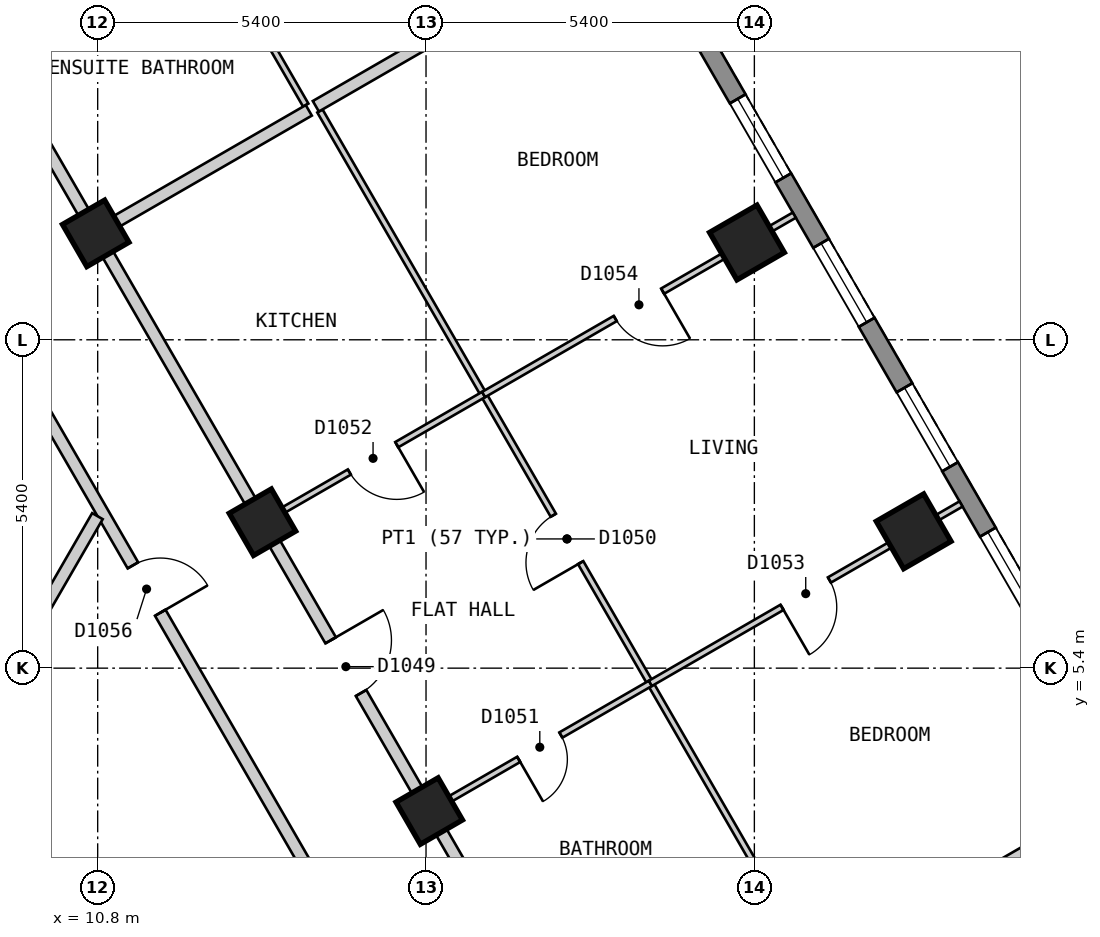
"""IFC4 building model, lengths in metres.
Left out: names, types, materials, properties, quantities, classifications, styles, units other than length and angle.
Written with IfcOpenShell. Run it as: python <this file> out.ifc"""

import sys

from ifc_helpers import new_model, si_unit, direction, frame, frame_2d, origin, origin_2d, place, context, subcontext, project, spatial, polyline, rectangle, outline, extrude, element, fill, save


model = new_model("IFC4")
c1 = context("Model", 3, precision=1e-05, world=origin(), true_north=direction((0.0, 1.0)))
c2 = subcontext(c1, "Body", "Model", "MODEL_VIEW")
j1 = project(units=[si_unit("LENGTHUNIT", "METRE"), si_unit("PLANEANGLEUNIT", "RADIAN")], contexts=[c1])
p1 = place(None, origin())
s1 = spatial("IfcSite", under=j1, at=p1, CompositionType="ELEMENT")
p2 = place(p1, origin())
s2 = spatial("IfcBuilding", under=s1, at=p2, CompositionType="ELEMENT")
p3 = place(p2, frame((0.0, 0.0, 126.6)))
s3 = spatial("IfcBuildingStorey", under=s2, at=p3, CompositionType="ELEMENT", Elevation=126.6)
for number, where, z_axis, x_axis in (
    (1, (24.22, 7.65, 0.0), (0.0, 0.0, 1.0), (-0.5, 0.866, 0.0)),
    (2, (21.478, 12.4, 0.0), (0.0, 0.0, 1.0), (-0.5, 0.866, 0.0)),
):
    element("IfcColumn", number, at=place(p3, frame(where, z_axis=z_axis, x_axis=x_axis)), inside=s3, PredefinedType="COLUMN", context=c2, shape_type="SweptSolid", body=[
        extrude(rectangle(XDim=0.9, YDim=0.9, at=origin_2d()), origin(), (0.0, 0.0, 1.0), 3.0),
    ])
for number, where, z_axis, x_axis in (
    (3, (16.253, 3.05, 0.0), (0.0, 0.0, 1.0), (-0.5, 0.866, 0.0)),
    (4, (13.51, 7.8, 0.0), (0.0, 0.0, 1.0), (-0.5, 0.866, 0.0)),
    (5, (10.768, 12.55, 0.0), (0.0, 0.0, 1.0), (-0.5, 0.866, 0.0)),
):
    element("IfcColumn", number, at=place(p3, frame(where, z_axis=z_axis, x_axis=x_axis)), inside=s3, PredefinedType="COLUMN", context=c2, shape_type="SweptSolid", body=[
        extrude(rectangle(XDim=0.8, YDim=0.8, at=origin_2d()), origin(), (0.0, 0.0, 1.0), 3.0),
    ])
p4 = place(p3, frame((28.218, 2.825, 0.0), z_axis=(0.0, 0.0, 1.0), x_axis=(-0.500020536353, 0.866013546791, 0.0)))
e6 = element("IfcWall", 6, at=p4, inside=s3, PredefinedType="SOLIDWALL", context=c2, shape_type="SweptSolid", body=[
    extrude(outline(polyline([(0.0, -0.15), (23.325, -0.15), (23.245, 0.15), (0.08, 0.15), (0.0, -0.15)])), origin(), (0.0, 0.0, 1.0), 2.7),
])
p5 = place(p4, frame((1.314, 0.0, 0.15)))
e7 = element("IfcOpeningElement", 7, at=p5, cuts=e6, PredefinedType="OPENING", context=c2, shape_type="SweptSolid", body=[
    extrude(rectangle(XDim=1.5, YDim=2.1, at=frame_2d((0.75, 1.05))), frame((0.0, 0.16, 0.0), z_axis=(0.0, -1.0, 0.0), x_axis=(1.0, 0.0, 0.0)), (0.0, 0.0, 1.0), 0.32),
])
p6 = place(p4, frame((4.056, 0.0, 0.15)))
e8 = element("IfcOpeningElement", 8, at=p6, cuts=e6, PredefinedType="OPENING", context=c2, shape_type="SweptSolid", body=[
    extrude(rectangle(XDim=1.5, YDim=2.1, at=frame_2d((0.75, 1.05))), frame((0.0, 0.16, 0.0), z_axis=(0.0, -1.0, 0.0), x_axis=(1.0, 0.0, 0.0)), (0.0, 0.0, 1.0), 0.32),
])
p7 = place(p4, frame((6.798, 0.0, 0.15)))
e9 = element("IfcOpeningElement", 9, at=p7, cuts=e6, PredefinedType="OPENING", context=c2, shape_type="SweptSolid", body=[
    extrude(rectangle(XDim=1.5, YDim=2.1, at=frame_2d((0.75, 1.05))), frame((0.0, 0.16, 0.0), z_axis=(0.0, -1.0, 0.0), x_axis=(1.0, 0.0, 0.0)), (0.0, 0.0, 1.0), 0.32),
])
p8 = place(p4, frame((9.541, 0.0, 0.15)))
e10 = element("IfcOpeningElement", 10, at=p8, cuts=e6, PredefinedType="OPENING", context=c2, shape_type="SweptSolid", body=[
    extrude(rectangle(XDim=1.5, YDim=2.1, at=frame_2d((0.75, 1.05))), frame((0.0, 0.16, 0.0), z_axis=(0.0, -1.0, 0.0), x_axis=(1.0, 0.0, 0.0)), (0.0, 0.0, 1.0), 0.32),
])
p9 = place(p4, frame((12.284, 0.0, 0.15)))
e11 = element("IfcOpeningElement", 11, at=p9, cuts=e6, PredefinedType="OPENING", context=c2, shape_type="SweptSolid", body=[
    extrude(rectangle(XDim=1.5, YDim=2.1, at=frame_2d((0.75, 1.05))), frame((0.0, 0.16, 0.0), z_axis=(0.0, -1.0, 0.0), x_axis=(1.0, 0.0, 0.0)), (0.0, 0.0, 1.0), 0.32),
])
p10 = place(p4, frame((15.027, 0.0, 0.15)))
e12 = element("IfcOpeningElement", 12, at=p10, cuts=e6, PredefinedType="OPENING", context=c2, shape_type="SweptSolid", body=[
    extrude(rectangle(XDim=1.5, YDim=2.1, at=frame_2d((0.75, 1.05))), frame((0.0, 0.16, 0.0), z_axis=(0.0, -1.0, 0.0), x_axis=(1.0, 0.0, 0.0)), (0.0, 0.0, 1.0), 0.32),
])
p11 = place(p4, frame((17.769, 0.0, 0.15)))
e13 = element("IfcOpeningElement", 13, at=p11, cuts=e6, PredefinedType="OPENING", context=c2, shape_type="SweptSolid", body=[
    extrude(rectangle(XDim=1.5, YDim=2.1, at=frame_2d((0.75, 1.05))), frame((0.0, 0.16, 0.0), z_axis=(0.0, -1.0, 0.0), x_axis=(1.0, 0.0, 0.0)), (0.0, 0.0, 1.0), 0.32),
])
p12 = place(p4, frame((20.511, 0.0, 0.15)))
e14 = element("IfcOpeningElement", 14, at=p12, cuts=e6, PredefinedType="OPENING", context=c2, shape_type="SweptSolid", body=[
    extrude(rectangle(XDim=1.5, YDim=2.1, at=frame_2d((0.75, 1.05))), frame((0.0, 0.16, 0.0), z_axis=(0.0, -1.0, 0.0), x_axis=(1.0, 0.0, 0.0)), (0.0, 0.0, 1.0), 0.32),
])
p13 = place(p3, frame((7.967, 13.0, 0.0), z_axis=(0.0, 0.0, 1.0), x_axis=(0.50003774998, -0.866003607726, 0.0)))
e15 = element("IfcWall", 15, at=p13, inside=s3, PredefinedType="PARTITIONING", context=c2, shape_type="SweptSolid", body=[
    extrude(rectangle(XDim=14.433, YDim=0.2, at=frame_2d((7.217, 0.0))), origin(), (0.0, 0.0, 1.0), 2.7),
])
p14 = place(p13, frame((6.824, 0.0, 0.0)))
e16 = element("IfcOpeningElement", 16, at=p14, cuts=e15, PredefinedType="OPENING", context=c2, shape_type="SweptSolid", body=[
    extrude(rectangle(XDim=0.9, YDim=2.1, at=frame_2d((0.45, 1.05))), frame((0.0, 0.11, 0.0), z_axis=(0.0, -1.0, 0.0), x_axis=(1.0, 0.0, 0.0)), (0.0, 0.0, 1.0), 0.22),
])
p15 = place(p3, frame((9.296, 15.1, 0.0), z_axis=(0.0, 0.0, 1.0), x_axis=(0.499974024244, -0.866040400375, 0.0)))
e17 = element("IfcWall", 17, at=p15, inside=s3, PredefinedType="PARTITIONING", context=c2, shape_type="SweptSolid", body=[
    extrude(rectangle(XDim=16.857, YDim=0.2, at=frame_2d((8.429, 0.0))), origin(), (0.0, 0.0, 1.0), 2.7),
])
p16 = place(p15, frame((10.672, 0.0, 0.0)))
e18 = element("IfcOpeningElement", 18, at=p16, cuts=e17, PredefinedType="OPENING", context=c2, shape_type="SweptSolid", body=[
    extrude(rectangle(XDim=1.0, YDim=2.1, at=frame_2d((0.5, 1.05))), frame((0.0, 0.11, 0.0), z_axis=(0.0, -1.0, 0.0), x_axis=(1.0, 0.0, 0.0)), (0.0, 0.0, 1.0), 0.22),
])
p17 = place(p3, frame((7.028, 1.373, 0.0), z_axis=(0.0, 0.0, 1.0), x_axis=(0.499954271211, 0.866051803703, 0.0)))
e19 = element("IfcWall", 19, at=p17, inside=s3, PredefinedType="PARTITIONING", context=c2, shape_type="SweptSolid", body=[
    extrude(rectangle(XDim=7.536, YDim=0.2, at=frame_2d((3.768, 0.0))), origin(), (0.0, 0.0, 1.0), 2.7),
])
p18 = place(p3, frame((11.603, 19.196, 0.0), z_axis=(0.0, 0.0, 1.0), x_axis=(0.499913406181, -0.866075392977, 0.0)))
e20 = element("IfcWall", 20, at=p18, inside=s3, PredefinedType="PARTITIONING", context=c2, shape_type="SweptSolid", body=[
    extrude(rectangle(XDim=5.239, YDim=0.1, at=frame_2d((2.619, 0.0))), origin(), (0.0, 0.0, 1.0), 2.7),
])
p19 = place(p18, frame((2.24, 0.0, 0.0)))
e21 = element("IfcOpeningElement", 21, at=p19, cuts=e20, PredefinedType="OPENING", context=c2, shape_type="SweptSolid", body=[
    extrude(rectangle(XDim=0.8, YDim=2.1, at=frame_2d((0.4, 1.05))), frame((0.0, 0.06, 0.0), z_axis=(0.0, -1.0, 0.0), x_axis=(1.0, 0.0, 0.0)), (0.0, 0.0, 1.0), 0.12),
])
p20 = place(p3, frame((14.455, 14.563, 0.0), z_axis=(0.0, 0.0, 1.0), x_axis=(0.500009803579, -0.866019743612, 0.0)))
e22 = element("IfcWall", 22, at=p20, inside=s3, PredefinedType="PARTITIONING", context=c2, shape_type="SweptSolid", body=[
    extrude(rectangle(XDim=16.254, YDim=0.1, at=frame_2d((8.127, 0.0))), origin(), (0.0, 0.0, 1.0), 2.7),
])
p21 = place(p20, frame((7.677, 0.0, 0.0)))
e23 = element("IfcOpeningElement", 23, at=p21, cuts=e22, PredefinedType="OPENING", context=c2, shape_type="SweptSolid", body=[
    extrude(rectangle(XDim=0.9, YDim=2.1, at=frame_2d((0.45, 1.05))), frame((0.0, 0.06, 0.0), z_axis=(0.0, -1.0, 0.0), x_axis=(1.0, 0.0, 0.0)), (0.0, 0.0, 1.0), 0.12),
])
p22 = place(p3, frame((9.238, 15.2, 0.0), z_axis=(0.0, 0.0, 1.0), x_axis=(0.499983303743, 0.866035043158, 0.0)))
e24 = element("IfcWall", 24, at=p22, inside=s3, PredefinedType="PARTITIONING", context=c2, shape_type="SweptSolid", body=[
    extrude(rectangle(XDim=4.672, YDim=0.1, at=frame_2d((2.336, 0.0))), origin(), (0.0, 0.0, 1.0), 2.7),
])
p23 = place(p3, frame((8.346, 15.3, 0.0), z_axis=(0.0, 0.0, 1.0), x_axis=(0.415189790387, 0.909734817383, 0.0)))
e25 = element("IfcWall", 25, at=p23, inside=s3, PredefinedType="PARTITIONING", context=c2, shape_type="SweptSolid", body=[
    extrude(rectangle(XDim=4.282, YDim=0.1, at=frame_2d((2.141, 0.0))), origin(), (0.0, 0.0, 1.0), 2.7),
])
p24 = place(p23, frame((1.714, 0.0, 0.0)))
e26 = element("IfcOpeningElement", 26, at=p24, cuts=e25, PredefinedType="OPENING", context=c2, shape_type="SweptSolid", body=[
    extrude(rectangle(XDim=0.8, YDim=2.1, at=frame_2d((0.4, 1.05))), frame((0.0, 0.06, 0.0), z_axis=(0.0, -1.0, 0.0), x_axis=(1.0, 0.0, 0.0)), (0.0, 0.0, 1.0), 0.12),
])
p25 = place(p3, frame((16.339, 3.1, 0.0), z_axis=(0.0, 0.0, 1.0), x_axis=(0.866050731258, 0.499956128963, 0.0)))
e27 = element("IfcWall", 27, at=p25, inside=s3, PredefinedType="PARTITIONING", context=c2, shape_type="SweptSolid", body=[
    extrude(rectangle(XDim=4.1, YDim=0.1, at=frame_2d((2.05, 0.0))), origin(), (0.0, 0.0, 1.0), 2.7),
])
p26 = place(p25, frame((1.6, 0.0, 0.0)))
e28 = element("IfcOpeningElement", 28, at=p26, cuts=e27, PredefinedType="OPENING", context=c2, shape_type="SweptSolid", body=[
    extrude(rectangle(XDim=0.8, YDim=2.1, at=frame_2d((0.4, 1.05))), frame((0.0, 0.06, 0.0), z_axis=(0.0, -1.0, 0.0), x_axis=(1.0, 0.0, 0.0)), (0.0, 0.0, 1.0), 0.12),
])
p27 = place(p3, frame((13.597, 7.85, 0.0), z_axis=(0.0, 0.0, 1.0), x_axis=(0.866006068523, 0.500033488159, 0.0)))
e29 = element("IfcWall", 29, at=p27, inside=s3, PredefinedType="PARTITIONING", context=c2, shape_type="SweptSolid", body=[
    extrude(rectangle(XDim=4.099, YDim=0.1, at=frame_2d((2.05, 0.0))), origin(), (0.0, 0.0, 1.0), 2.7),
])
p28 = place(p27, frame((1.55, 0.0, 0.0)))
e30 = element("IfcOpeningElement", 30, at=p28, cuts=e29, PredefinedType="OPENING", context=c2, shape_type="SweptSolid", body=[
    extrude(rectangle(XDim=0.9, YDim=2.1, at=frame_2d((0.45, 1.05))), frame((0.0, 0.06, 0.0), z_axis=(0.0, -1.0, 0.0), x_axis=(1.0, 0.0, 0.0)), (0.0, 0.0, 1.0), 0.12),
])
p29 = place(p3, frame((22.634, 0.401, 0.0), z_axis=(0.0, 0.0, 1.0), x_axis=(0.86601325737, 0.500021037617, 0.0)))
e31 = element("IfcWall", 31, at=p29, inside=s3, PredefinedType="PARTITIONING", context=c2, shape_type="SweptSolid", body=[
    extrude(rectangle(XDim=5.898, YDim=0.2, at=frame_2d((2.949, 0.0))), origin(), (0.0, 0.0, 1.0), 2.7),
])
p30 = place(p3, frame((10.854, 12.6, 0.0), z_axis=(0.0, 0.0, 1.0), x_axis=(0.866076396086, 0.499911668341, 0.0)))
e32 = element("IfcWall", 32, at=p30, inside=s3, PredefinedType="PARTITIONING", context=c2, shape_type="SweptSolid", body=[
    extrude(rectangle(XDim=3.947, YDim=0.2, at=frame_2d((1.973, 0.0))), origin(), (0.0, 0.0, 1.0), 2.7),
])
p31 = place(p3, frame((14.388, 14.64, 0.0), z_axis=(0.0, 0.0, 1.0), x_axis=(0.866044090212, 0.499967632761, 0.0)))
e33 = element("IfcWall", 33, at=p31, inside=s3, PredefinedType="PARTITIONING", context=c2, shape_type="SweptSolid", body=[
    extrude(rectangle(XDim=5.919, YDim=0.2, at=frame_2d((2.959, 0.0))), origin(), (0.0, 0.0, 1.0), 2.7),
])
p32 = place(p3, frame((19.89, 5.15, 0.0), z_axis=(0.0, 0.0, 1.0), x_axis=(0.865993310977, 0.500055582255, 0.0)))
e34 = element("IfcWall", 34, at=p32, inside=s3, PredefinedType="PARTITIONING", context=c2, shape_type="SweptSolid", body=[
    extrude(rectangle(XDim=5.9, YDim=0.1, at=frame_2d((2.95, 0.0))), origin(), (0.0, 0.0, 1.0), 2.7),
])
p33 = place(p32, frame((2.5, 0.0, 0.0)))
e35 = element("IfcOpeningElement", 35, at=p33, cuts=e34, PredefinedType="OPENING", context=c2, shape_type="SweptSolid", body=[
    extrude(rectangle(XDim=0.9, YDim=2.1, at=frame_2d((0.45, 1.05))), frame((0.0, 0.06, 0.0), z_axis=(0.0, -1.0, 0.0), x_axis=(1.0, 0.0, 0.0)), (0.0, 0.0, 1.0), 0.12),
])
p34 = place(p3, frame((17.147, 9.9, 0.0), z_axis=(0.0, 0.0, 1.0), x_axis=(0.866034692906, 0.499983910424, 0.0)))
e36 = element("IfcWall", 36, at=p34, inside=s3, PredefinedType="PARTITIONING", context=c2, shape_type="SweptSolid", body=[
    extrude(rectangle(XDim=5.901, YDim=0.1, at=frame_2d((2.95, 0.0))), origin(), (0.0, 0.0, 1.0), 2.7),
])
p35 = place(p34, frame((2.5, 0.0, 0.0)))
e37 = element("IfcOpeningElement", 37, at=p35, cuts=e36, PredefinedType="OPENING", context=c2, shape_type="SweptSolid", body=[
    extrude(rectangle(XDim=0.9, YDim=2.1, at=frame_2d((0.45, 1.05))), frame((0.0, 0.06, 0.0), z_axis=(0.0, -1.0, 0.0), x_axis=(1.0, 0.0, 0.0)), (0.0, 0.0, 1.0), 0.12),
])
p36 = place(p6, origin())
e38 = element("IfcWindow", 38, at=p36, inside=s3, PartitioningType="SINGLE_PANEL", PredefinedType="WINDOW", context=c2, shape_type="SweptSolid", body=[
    extrude(rectangle(XDim=1.5, YDim=2.1, at=frame_2d((0.75, 1.05))), frame((0.0, 0.03, 0.0), z_axis=(0.0, -1.0, 0.0), x_axis=(1.0, 0.0, 0.0)), (0.0, 0.0, 1.0), 0.06),
])
fill(e8, e38)
p37 = place(p7, origin())
e39 = element("IfcWindow", 39, at=p37, inside=s3, PartitioningType="SINGLE_PANEL", PredefinedType="WINDOW", context=c2, shape_type="SweptSolid", body=[
    extrude(rectangle(XDim=1.5, YDim=2.1, at=frame_2d((0.75, 1.05))), frame((0.0, 0.03, 0.0), z_axis=(0.0, -1.0, 0.0), x_axis=(1.0, 0.0, 0.0)), (0.0, 0.0, 1.0), 0.06),
])
fill(e9, e39)
p38 = place(p8, origin())
e40 = element("IfcWindow", 40, at=p38, inside=s3, PartitioningType="SINGLE_PANEL", PredefinedType="WINDOW", context=c2, shape_type="SweptSolid", body=[
    extrude(rectangle(XDim=1.5, YDim=2.1, at=frame_2d((0.75, 1.05))), frame((0.0, 0.03, 0.0), z_axis=(0.0, -1.0, 0.0), x_axis=(1.0, 0.0, 0.0)), (0.0, 0.0, 1.0), 0.06),
])
fill(e10, e40)
p39 = place(p9, origin())
e41 = element("IfcWindow", 41, at=p39, inside=s3, PartitioningType="SINGLE_PANEL", PredefinedType="WINDOW", context=c2, shape_type="SweptSolid", body=[
    extrude(rectangle(XDim=1.5, YDim=2.1, at=frame_2d((0.75, 1.05))), frame((0.0, 0.03, 0.0), z_axis=(0.0, -1.0, 0.0), x_axis=(1.0, 0.0, 0.0)), (0.0, 0.0, 1.0), 0.06),
])
fill(e11, e41)
p40 = place(p16, origin())
e42 = element("IfcDoor", 42, at=p40, inside=s3, OperationType="SINGLE_SWING_LEFT", PredefinedType="DOOR", context=c2, shape_type="SweptSolid", body=[
    extrude(rectangle(XDim=1.0, YDim=2.1, at=frame_2d((0.5, 1.05))), frame((0.0, 0.025, 0.0), z_axis=(0.0, -1.0, 0.0), x_axis=(1.0, 0.0, 0.0)), (0.0, 0.0, 1.0), 0.05),
])
fill(e18, e42)
p41 = place(p21, origin())
e43 = element("IfcDoor", 43, at=p41, inside=s3, OperationType="SINGLE_SWING_RIGHT", PredefinedType="DOOR", context=c2, shape_type="SweptSolid", body=[
    extrude(rectangle(XDim=0.9, YDim=2.1, at=frame_2d((0.45, 1.05))), frame((0.0, 0.025, 0.0), z_axis=(0.0, -1.0, 0.0), x_axis=(1.0, 0.0, 0.0)), (0.0, 0.0, 1.0), 0.05),
])
fill(e23, e43)
p42 = place(p26, origin())
e44 = element("IfcDoor", 44, at=p42, inside=s3, OperationType="SINGLE_SWING_LEFT", PredefinedType="DOOR", context=c2, shape_type="SweptSolid", body=[
    extrude(rectangle(XDim=0.8, YDim=2.1, at=frame_2d((0.4, 1.05))), frame((0.0, 0.025, 0.0), z_axis=(0.0, -1.0, 0.0), x_axis=(1.0, 0.0, 0.0)), (0.0, 0.0, 1.0), 0.05),
])
fill(e28, e44)
p43 = place(p28, origin())
e45 = element("IfcDoor", 45, at=p43, inside=s3, OperationType="SINGLE_SWING_RIGHT", PredefinedType="DOOR", context=c2, shape_type="SweptSolid", body=[
    extrude(rectangle(XDim=0.9, YDim=2.1, at=frame_2d((0.45, 1.05))), frame((0.0, 0.025, 0.0), z_axis=(0.0, -1.0, 0.0), x_axis=(1.0, 0.0, 0.0)), (0.0, 0.0, 1.0), 0.05),
])
fill(e30, e45)
p44 = place(p33, origin())
e46 = element("IfcDoor", 46, at=p44, inside=s3, OperationType="SINGLE_SWING_LEFT", PredefinedType="DOOR", context=c2, shape_type="SweptSolid", body=[
    extrude(rectangle(XDim=0.9, YDim=2.1, at=frame_2d((0.45, 1.05))), frame((0.0, 0.025, 0.0), z_axis=(0.0, -1.0, 0.0), x_axis=(1.0, 0.0, 0.0)), (0.0, 0.0, 1.0), 0.05),
])
fill(e35, e46)
p45 = place(p35, origin())
e47 = element("IfcDoor", 47, at=p45, inside=s3, OperationType="SINGLE_SWING_RIGHT", PredefinedType="DOOR", context=c2, shape_type="SweptSolid", body=[
    extrude(rectangle(XDim=0.9, YDim=2.1, at=frame_2d((0.45, 1.05))), frame((0.0, 0.025, 0.0), z_axis=(0.0, -1.0, 0.0), x_axis=(1.0, 0.0, 0.0)), (0.0, 0.0, 1.0), 0.05),
])
fill(e37, e47)
p46 = place(p14, origin())
e48 = element("IfcDoor", 48, at=p46, inside=s3, OperationType="SINGLE_SWING_RIGHT", PredefinedType="DOOR", context=c2, shape_type="SweptSolid", body=[
    extrude(rectangle(XDim=0.9, YDim=2.1, at=frame_2d((0.45, 1.05))), frame((0.0, 0.025, 0.0), z_axis=(0.0, -1.0, 0.0), x_axis=(1.0, 0.0, 0.0)), (0.0, 0.0, 1.0), 0.05),
])
fill(e16, e48)
save(model, sys.argv[1])
